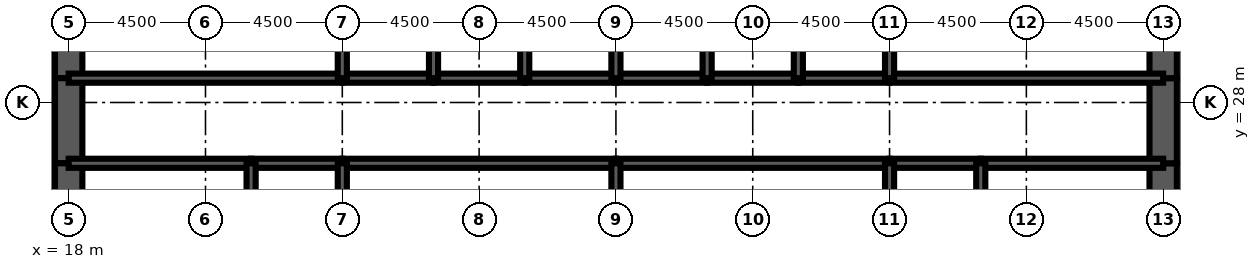
"""IFC4 building model, lengths in metres.
Left out: names, types, materials, properties, quantities, classifications, styles, units other than length and angle.
Written with IfcOpenShell. Run it as: python <this file> out.ifc"""

import sys

from ifc_helpers import new_model, si_unit, direction, frame, frame_2d, origin, place, context, subcontext, project, spatial, rectangle, extrude, element, fill, save


model = new_model("IFC4")
c1 = context("Model", 3, precision=1e-05, world=origin(), true_north=direction((0.0, 1.0)))
c2 = subcontext(c1, "Body", "Model", "MODEL_VIEW")
j1 = project(units=[si_unit("LENGTHUNIT", "METRE"), si_unit("PLANEANGLEUNIT", "RADIAN")], contexts=[c1])
p1 = place(None, origin())
s1 = spatial("IfcSite", under=j1, at=p1, CompositionType="ELEMENT")
p2 = place(p1, origin())
s2 = spatial("IfcBuilding", under=s1, at=p2, CompositionType="ELEMENT")
p3 = place(p2, frame((0.0, 0.0, 32.0)))
s3 = spatial("IfcBuildingStorey", under=s2, at=p3, CompositionType="ELEMENT", Elevation=32.0)
p4 = place(p3, frame((18.0, 32.0, 0.0), z_axis=(0.0, 0.0, 1.0), x_axis=(0.0, -1.0, 0.0)))
e1 = element("IfcWall", 1, at=p4, inside=s3, PredefinedType="SHEAR", context=c2, shape_type="SweptSolid", body=[
    extrude(rectangle(XDim=3.2, YDim=0.9, at=frame_2d((1.6, 0.0))), origin(), (0.0, 0.0, 1.0), 4.5),
])
p5 = place(p3, frame((18.0, 28.8, 0.0), z_axis=(0.0, 0.0, 1.0), x_axis=(0.0, -1.0, 0.0)))
e2 = element("IfcWall", 2, at=p5, inside=s3, PredefinedType="SHEAR", context=c2, shape_type="SweptSolid", body=[
    extrude(rectangle(XDim=2.8, YDim=0.9, at=frame_2d((1.4, 0.0))), origin(), (0.0, 0.0, 1.0), 4.5),
])
p6 = place(p5, frame((0.4, 0.0, 0.0)))
e3 = element("IfcOpeningElement", 3, at=p6, cuts=e2, PredefinedType="OPENING", context=c2, shape_type="SweptSolid", body=[
    extrude(rectangle(XDim=1.8, YDim=2.1, at=frame_2d((0.9, 1.05))), frame((0.0, 0.46, 0.0), z_axis=(0.0, -1.0, 0.0), x_axis=(1.0, 0.0, 0.0)), (0.0, 0.0, 1.0), 0.92),
])
for number, where, z_axis, x_axis in (
    (4, (18.0, 26.0, 0.0), (0.0, 0.0, 1.0), (0.0, -1.0, 0.0)),
    (5, (54.0, 22.0, 0.0), (0.0, 0.0, 1.0), (0.0, 1.0, 0.0)),
):
    element("IfcWall", number, at=place(p3, frame(where, z_axis=z_axis, x_axis=x_axis)), inside=s3, PredefinedType="SHEAR", context=c2, shape_type="SweptSolid", body=[
        extrude(rectangle(XDim=4.0, YDim=0.9, at=frame_2d((2.0, 0.0))), origin(), (0.0, 0.0, 1.0), 4.5),
    ])
p7 = place(p3, frame((54.0, 26.0, 0.0), z_axis=(0.0, 0.0, 1.0), x_axis=(0.0, 1.0, 0.0)))
e6 = element("IfcWall", 6, at=p7, inside=s3, PredefinedType="SHEAR", context=c2, shape_type="SweptSolid", body=[
    extrude(rectangle(XDim=2.8, YDim=0.9, at=frame_2d((1.4, 0.0))), origin(), (0.0, 0.0, 1.0), 4.5),
])
p8 = place(p7, frame((0.6, 0.0, 0.0)))
e7 = element("IfcOpeningElement", 7, at=p8, cuts=e6, PredefinedType="OPENING", context=c2, shape_type="SweptSolid", body=[
    extrude(rectangle(XDim=1.8, YDim=2.1, at=frame_2d((0.9, 1.05))), frame((0.0, 0.46, 0.0), z_axis=(0.0, -1.0, 0.0), x_axis=(1.0, 0.0, 0.0)), (0.0, 0.0, 1.0), 0.92),
])
p9 = place(p3, frame((54.0, 28.8, 0.0), z_axis=(0.0, 0.0, 1.0), x_axis=(0.0, 1.0, 0.0)))
e8 = element("IfcWall", 8, at=p9, inside=s3, PredefinedType="SHEAR", context=c2, shape_type="SweptSolid", body=[
    extrude(rectangle(XDim=3.2, YDim=0.9, at=frame_2d((1.6, 0.0))), origin(), (0.0, 0.0, 1.0), 4.5),
])
p10 = place(p3, frame((18.0, 28.8, 0.0), z_axis=(0.0, 0.0, 1.0), x_axis=(1.0, 0.0, 0.0)))
e9 = element("IfcWall", 9, at=p10, inside=s3, PredefinedType="SOLIDWALL", context=c2, shape_type="SweptSolid", body=[
    extrude(rectangle(XDim=9.0, YDim=0.3, at=frame_2d((4.5, 0.0))), origin(), (0.0, 0.0, 1.0), 4.5),
])
p11 = place(p10, frame((0.65, 0.0, 0.0)))
e10 = element("IfcOpeningElement", 10, at=p11, cuts=e9, PredefinedType="OPENING", context=c2, shape_type="SweptSolid", body=[
    extrude(rectangle(XDim=1.0, YDim=2.1, at=frame_2d((0.5, 1.05))), frame((0.0, 0.16, 0.0), z_axis=(0.0, -1.0, 0.0), x_axis=(1.0, 0.0, 0.0)), (0.0, 0.0, 1.0), 0.32),
])
p12 = place(p3, frame((27.0, 28.8, 0.0), z_axis=(0.0, 0.0, 1.0), x_axis=(1.0, 0.0, 0.0)))
e11 = element("IfcWall", 11, at=p12, inside=s3, PredefinedType="SOLIDWALL", context=c2, shape_type="SweptSolid", body=[
    extrude(rectangle(XDim=3.0, YDim=0.3, at=frame_2d((1.5, 0.0))), origin(), (0.0, 0.0, 1.0), 4.5),
])
p13 = place(p12, frame((0.95, 0.0, 0.0)))
e12 = element("IfcOpeningElement", 12, at=p13, cuts=e11, PredefinedType="OPENING", context=c2, shape_type="SweptSolid", body=[
    extrude(rectangle(XDim=1.1, YDim=2.2, at=frame_2d((0.55, 1.1))), frame((0.0, 0.16, 0.0), z_axis=(0.0, -1.0, 0.0), x_axis=(1.0, 0.0, 0.0)), (0.0, 0.0, 1.0), 0.32),
])
p14 = place(p3, frame((30.0, 28.8, 0.0), z_axis=(0.0, 0.0, 1.0), x_axis=(1.0, 0.0, 0.0)))
e13 = element("IfcWall", 13, at=p14, inside=s3, PredefinedType="SOLIDWALL", context=c2, shape_type="SweptSolid", body=[
    extrude(rectangle(XDim=3.0, YDim=0.3, at=frame_2d((1.5, 0.0))), origin(), (0.0, 0.0, 1.0), 4.5),
])
p15 = place(p14, frame((0.95, 0.0, 0.0)))
e14 = element("IfcOpeningElement", 14, at=p15, cuts=e13, PredefinedType="OPENING", context=c2, shape_type="SweptSolid", body=[
    extrude(rectangle(XDim=1.1, YDim=2.2, at=frame_2d((0.55, 1.1))), frame((0.0, 0.16, 0.0), z_axis=(0.0, -1.0, 0.0), x_axis=(1.0, 0.0, 0.0)), (0.0, 0.0, 1.0), 0.32),
])
p16 = place(p3, frame((33.0, 28.8, 0.0), z_axis=(0.0, 0.0, 1.0), x_axis=(1.0, 0.0, 0.0)))
e15 = element("IfcWall", 15, at=p16, inside=s3, PredefinedType="SOLIDWALL", context=c2, shape_type="SweptSolid", body=[
    extrude(rectangle(XDim=3.0, YDim=0.3, at=frame_2d((1.5, 0.0))), origin(), (0.0, 0.0, 1.0), 4.5),
])
p17 = place(p16, frame((0.95, 0.0, 0.0)))
e16 = element("IfcOpeningElement", 16, at=p17, cuts=e15, PredefinedType="OPENING", context=c2, shape_type="SweptSolid", body=[
    extrude(rectangle(XDim=1.1, YDim=2.2, at=frame_2d((0.55, 1.1))), frame((0.0, 0.16, 0.0), z_axis=(0.0, -1.0, 0.0), x_axis=(1.0, 0.0, 0.0)), (0.0, 0.0, 1.0), 0.32),
])
for number, where, z_axis, x_axis in (
    (17, (36.0, 28.8, 0.0), (0.0, 0.0, 1.0), (1.0, 0.0, 0.0)),
    (18, (39.0, 28.8, 0.0), (0.0, 0.0, 1.0), (1.0, 0.0, 0.0)),
):
    element("IfcWall", number, at=place(p3, frame(where, z_axis=z_axis, x_axis=x_axis)), inside=s3, PredefinedType="SOLIDWALL", context=c2, shape_type="SweptSolid", body=[
        extrude(rectangle(XDim=3.0, YDim=0.3, at=frame_2d((1.5, 0.0))), origin(), (0.0, 0.0, 1.0), 4.5),
    ])
p18 = place(p3, frame((42.0, 28.8, 0.0), z_axis=(0.0, 0.0, 1.0), x_axis=(1.0, 0.0, 0.0)))
e19 = element("IfcWall", 19, at=p18, inside=s3, PredefinedType="SOLIDWALL", context=c2, shape_type="SweptSolid", body=[
    extrude(rectangle(XDim=3.0, YDim=0.3, at=frame_2d((1.5, 0.0))), origin(), (0.0, 0.0, 1.0), 4.5),
])
p19 = place(p18, frame((0.95, 0.0, 0.0)))
e20 = element("IfcOpeningElement", 20, at=p19, cuts=e19, PredefinedType="OPENING", context=c2, shape_type="SweptSolid", body=[
    extrude(rectangle(XDim=1.1, YDim=2.2, at=frame_2d((0.55, 1.1))), frame((0.0, 0.16, 0.0), z_axis=(0.0, -1.0, 0.0), x_axis=(1.0, 0.0, 0.0)), (0.0, 0.0, 1.0), 0.32),
])
p20 = place(p3, frame((45.0, 28.8, 0.0), z_axis=(0.0, 0.0, 1.0), x_axis=(1.0, 0.0, 0.0)))
e21 = element("IfcWall", 21, at=p20, inside=s3, PredefinedType="SOLIDWALL", context=c2, shape_type="SweptSolid", body=[
    extrude(rectangle(XDim=9.0, YDim=0.3, at=frame_2d((4.5, 0.0))), origin(), (0.0, 0.0, 1.0), 4.5),
])
p21 = place(p20, frame((7.35, 0.0, 0.0)))
e22 = element("IfcOpeningElement", 22, at=p21, cuts=e21, PredefinedType="OPENING", context=c2, shape_type="SweptSolid", body=[
    extrude(rectangle(XDim=1.0, YDim=2.1, at=frame_2d((0.5, 1.05))), frame((0.0, 0.16, 0.0), z_axis=(0.0, -1.0, 0.0), x_axis=(1.0, 0.0, 0.0)), (0.0, 0.0, 1.0), 0.32),
])
p22 = place(p3, frame((18.0, 26.0, 0.0), z_axis=(0.0, 0.0, 1.0), x_axis=(1.0, 0.0, 0.0)))
e23 = element("IfcWall", 23, at=p22, inside=s3, PredefinedType="SOLIDWALL", context=c2, shape_type="SweptSolid", body=[
    extrude(rectangle(XDim=6.0, YDim=0.3, at=frame_2d((3.0, 0.0))), origin(), (0.0, 0.0, 1.0), 4.5),
])
p23 = place(p3, frame((24.0, 26.0, 0.0), z_axis=(0.0, 0.0, 1.0), x_axis=(1.0, 0.0, 0.0)))
e24 = element("IfcWall", 24, at=p23, inside=s3, PredefinedType="SOLIDWALL", context=c2, shape_type="SweptSolid", body=[
    extrude(rectangle(XDim=3.0, YDim=0.3, at=frame_2d((1.5, 0.0))), origin(), (0.0, 0.0, 1.0), 4.5),
])
for number, where, z_axis, x_axis in (
    (25, (27.0, 26.0, 0.0), (0.0, 0.0, 1.0), (1.0, 0.0, 0.0)),
    (26, (36.0, 26.0, 0.0), (0.0, 0.0, 1.0), (1.0, 0.0, 0.0)),
):
    element("IfcWall", number, at=place(p3, frame(where, z_axis=z_axis, x_axis=x_axis)), inside=s3, PredefinedType="SOLIDWALL", context=c2, shape_type="SweptSolid", body=[
        extrude(rectangle(XDim=9.0, YDim=0.3, at=frame_2d((4.5, 0.0))), origin(), (0.0, 0.0, 1.0), 4.5),
    ])
p24 = place(p3, frame((45.0, 26.0, 0.0), z_axis=(0.0, 0.0, 1.0), x_axis=(1.0, 0.0, 0.0)))
e27 = element("IfcWall", 27, at=p24, inside=s3, PredefinedType="SOLIDWALL", context=c2, shape_type="SweptSolid", body=[
    extrude(rectangle(XDim=3.0, YDim=0.3, at=frame_2d((1.5, 0.0))), origin(), (0.0, 0.0, 1.0), 4.5),
])
p25 = place(p3, frame((48.0, 26.0, 0.0), z_axis=(0.0, 0.0, 1.0), x_axis=(1.0, 0.0, 0.0)))
e28 = element("IfcWall", 28, at=p25, inside=s3, PredefinedType="SOLIDWALL", context=c2, shape_type="SweptSolid", body=[
    extrude(rectangle(XDim=6.0, YDim=0.3, at=frame_2d((3.0, 0.0))), origin(), (0.0, 0.0, 1.0), 4.5),
])
for number, where, z_axis, x_axis in (
    (29, (27.0, 28.8, 0.0), (0.0, 0.0, 1.0), (0.0, 1.0, 0.0)),
    (30, (30.0, 28.8, 0.0), (0.0, 0.0, 1.0), (0.0, 1.0, 0.0)),
    (31, (33.0, 28.8, 0.0), (0.0, 0.0, 1.0), (0.0, 1.0, 0.0)),
    (32, (36.0, 28.8, 0.0), (0.0, 0.0, 1.0), (0.0, 1.0, 0.0)),
    (33, (39.0, 28.8, 0.0), (0.0, 0.0, 1.0), (0.0, 1.0, 0.0)),
    (34, (42.0, 28.8, 0.0), (0.0, 0.0, 1.0), (0.0, 1.0, 0.0)),
    (35, (45.0, 28.8, 0.0), (0.0, 0.0, 1.0), (0.0, 1.0, 0.0)),
):
    element("IfcWall", number, at=place(p3, frame(where, z_axis=z_axis, x_axis=x_axis)), inside=s3, PredefinedType="SOLIDWALL", context=c2, shape_type="SweptSolid", body=[
        extrude(rectangle(XDim=3.2, YDim=0.3, at=frame_2d((1.6, 0.0))), origin(), (0.0, 0.0, 1.0), 4.5),
    ])
for number, where, z_axis, x_axis in (
    (36, (24.0, 22.0, 0.0), (0.0, 0.0, 1.0), (0.0, 1.0, 0.0)),
    (37, (27.0, 22.0, 0.0), (0.0, 0.0, 1.0), (0.0, 1.0, 0.0)),
    (38, (36.0, 22.0, 0.0), (0.0, 0.0, 1.0), (0.0, 1.0, 0.0)),
    (39, (45.0, 22.0, 0.0), (0.0, 0.0, 1.0), (0.0, 1.0, 0.0)),
    (40, (48.0, 22.0, 0.0), (0.0, 0.0, 1.0), (0.0, 1.0, 0.0)),
):
    element("IfcWall", number, at=place(p3, frame(where, z_axis=z_axis, x_axis=x_axis)), inside=s3, PredefinedType="SOLIDWALL", context=c2, shape_type="SweptSolid", body=[
        extrude(rectangle(XDim=4.0, YDim=0.3, at=frame_2d((2.0, 0.0))), origin(), (0.0, 0.0, 1.0), 4.5),
    ])
p26 = place(p3, frame((39.0, 22.15, 0.0), z_axis=(0.0, 0.0, 1.0), x_axis=(0.0, 1.0, 0.0)))
e41 = element("IfcWall", 41, at=p26, inside=s3, PredefinedType="PARTITIONING", context=c2, shape_type="SweptSolid", body=[
    extrude(rectangle(XDim=3.7, YDim=0.15, at=frame_2d((1.85, 0.0))), origin(), (0.0, 0.0, 1.0), 3.0),
])
p27 = place(p26, frame((2.2, 0.0, 0.0)))
e42 = element("IfcOpeningElement", 42, at=p27, cuts=e41, PredefinedType="OPENING", context=c2, shape_type="SweptSolid", body=[
    extrude(rectangle(XDim=1.0, YDim=2.1, at=frame_2d((0.5, 1.05))), frame((0.0, 0.085, 0.0), z_axis=(0.0, -1.0, 0.0), x_axis=(1.0, 0.0, 0.0)), (0.0, 0.0, 1.0), 0.17),
])
p28 = place(p3, frame((20.625, 22.15, 0.0), z_axis=(0.0, 0.0, 1.0), x_axis=(0.0, 1.0, 0.0)))
e43 = element("IfcWall", 43, at=p28, inside=s3, PredefinedType="PARTITIONING", context=c2, shape_type="SweptSolid", body=[
    extrude(rectangle(XDim=3.7, YDim=0.15, at=frame_2d((1.85, 0.0))), origin(), (0.0, 0.0, 1.0), 3.0),
])
p29 = place(p27, origin())
e44 = element("IfcDoor", 44, at=p29, inside=s3, OperationType="SINGLE_SWING_RIGHT", PredefinedType="DOOR", context=c2, shape_type="SweptSolid", body=[
    extrude(rectangle(XDim=1.0, YDim=2.1, at=frame_2d((0.5, 1.05))), frame((0.0, 0.025, 0.0), z_axis=(0.0, -1.0, 0.0), x_axis=(1.0, 0.0, 0.0)), (0.0, 0.0, 1.0), 0.05),
])
fill(e42, e44)
p30 = place(p19, origin())
e45 = element("IfcDoor", 45, at=p30, inside=s3, OperationType="DOUBLE_DOOR_SLIDING", PredefinedType="USERDEFINED", context=c2, shape_type="SweptSolid", body=[
    extrude(rectangle(XDim=1.1, YDim=2.2, at=frame_2d((0.55, 1.1))), frame((0.0, 0.025, 0.0), z_axis=(0.0, -1.0, 0.0), x_axis=(1.0, 0.0, 0.0)), (0.0, 0.0, 1.0), 0.05),
])
fill(e20, e45)
p31 = place(p13, origin())
e46 = element("IfcDoor", 46, at=p31, inside=s3, OperationType="DOUBLE_DOOR_SLIDING", PredefinedType="USERDEFINED", context=c2, shape_type="SweptSolid", body=[
    extrude(rectangle(XDim=1.1, YDim=2.2, at=frame_2d((0.55, 1.1))), frame((0.0, 0.025, 0.0), z_axis=(0.0, -1.0, 0.0), x_axis=(1.0, 0.0, 0.0)), (0.0, 0.0, 1.0), 0.05),
])
fill(e12, e46)
p32 = place(p15, origin())
e47 = element("IfcDoor", 47, at=p32, inside=s3, OperationType="DOUBLE_DOOR_SLIDING", PredefinedType="USERDEFINED", context=c2, shape_type="SweptSolid", body=[
    extrude(rectangle(XDim=1.1, YDim=2.2, at=frame_2d((0.55, 1.1))), frame((0.0, 0.025, 0.0), z_axis=(0.0, -1.0, 0.0), x_axis=(1.0, 0.0, 0.0)), (0.0, 0.0, 1.0), 0.05),
])
fill(e14, e47)
p33 = place(p17, origin())
e48 = element("IfcDoor", 48, at=p33, inside=s3, OperationType="DOUBLE_DOOR_SLIDING", PredefinedType="USERDEFINED", context=c2, shape_type="SweptSolid", body=[
    extrude(rectangle(XDim=1.1, YDim=2.2, at=frame_2d((0.55, 1.1))), frame((0.0, 0.025, 0.0), z_axis=(0.0, -1.0, 0.0), x_axis=(1.0, 0.0, 0.0)), (0.0, 0.0, 1.0), 0.05),
])
fill(e16, e48)
p34 = place(p11, origin())
e49 = element("IfcDoor", 49, at=p34, inside=s3, OperationType="SINGLE_SWING_LEFT", PredefinedType="DOOR", context=c2, shape_type="SweptSolid", body=[
    extrude(rectangle(XDim=1.0, YDim=2.1, at=frame_2d((0.5, 1.05))), frame((0.0, 0.025, 0.0), z_axis=(0.0, -1.0, 0.0), x_axis=(1.0, 0.0, 0.0)), (0.0, 0.0, 1.0), 0.05),
])
fill(e10, e49)
p35 = place(p21, origin())
e50 = element("IfcDoor", 50, at=p35, inside=s3, OperationType="SINGLE_SWING_RIGHT", PredefinedType="DOOR", context=c2, shape_type="SweptSolid", body=[
    extrude(rectangle(XDim=1.0, YDim=2.1, at=frame_2d((0.5, 1.05))), frame((0.0, 0.025, 0.0), z_axis=(0.0, -1.0, 0.0), x_axis=(1.0, 0.0, 0.0)), (0.0, 0.0, 1.0), 0.05),
])
fill(e22, e50)
p36 = place(p6, origin())
e51 = element("IfcDoor", 51, at=p36, inside=s3, OperationType="SINGLE_SWING_LEFT", PredefinedType="DOOR", context=c2, shape_type="SweptSolid", body=[
    extrude(rectangle(XDim=1.8, YDim=2.1, at=frame_2d((0.9, 1.05))), frame((0.0, 0.45, 0.0), z_axis=(0.0, -1.0, 0.0), x_axis=(1.0, 0.0, 0.0)), (0.0, 0.0, 1.0), 0.899),
])
fill(e3, e51)
p37 = place(p8, origin())
e52 = element("IfcDoor", 52, at=p37, inside=s3, OperationType="SINGLE_SWING_LEFT", PredefinedType="DOOR", context=c2, shape_type="SweptSolid", body=[
    extrude(rectangle(XDim=1.8, YDim=2.1, at=frame_2d((0.9, 1.05))), frame((0.0, 0.45, 0.0), z_axis=(0.0, -1.0, 0.0), x_axis=(1.0, 0.0, 0.0)), (0.0, 0.0, 1.0), 0.899),
])
fill(e7, e52)
save(model, sys.argv[1])
